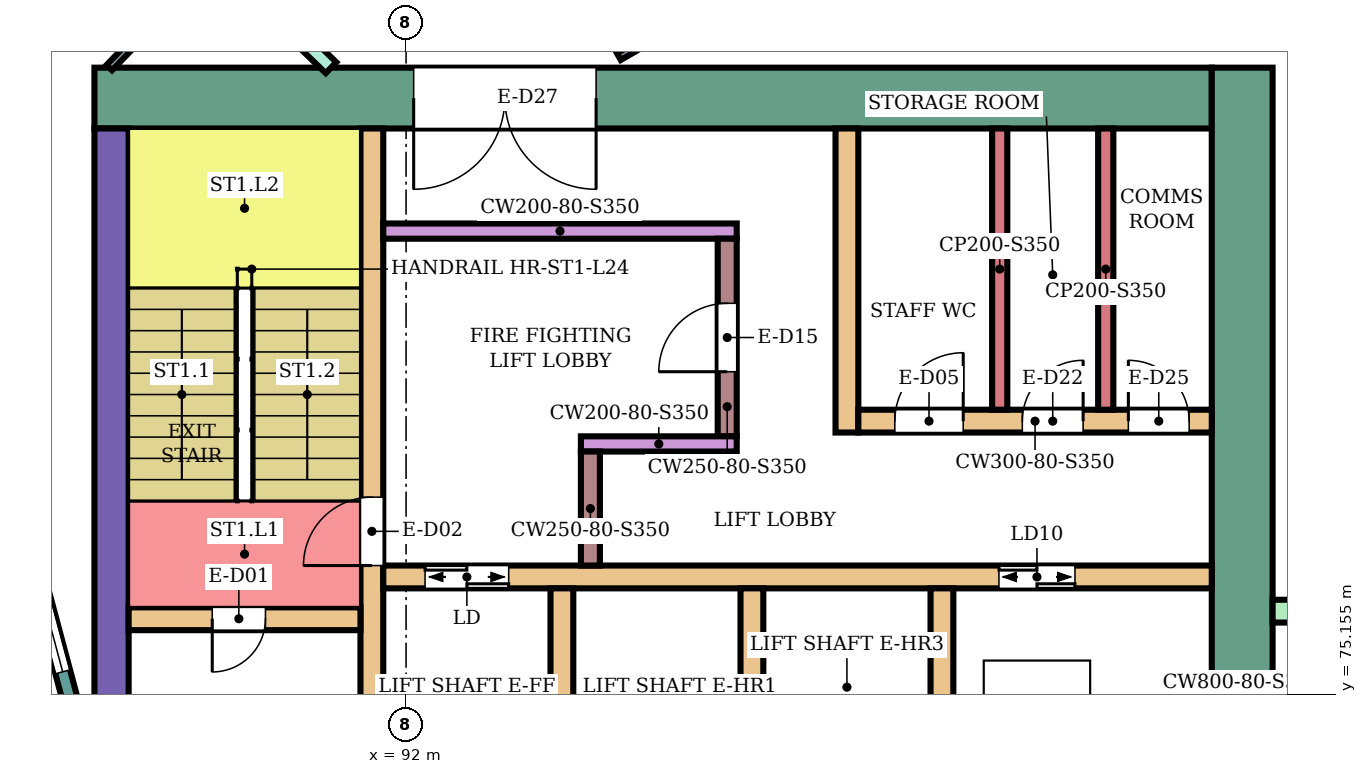
"""IFC4 building model, lengths in metres.
Left out: names, types, materials, properties, quantities, classifications, styles, units other than length and angle.
Written with IfcOpenShell. Run it as: python <this file> out.ifc"""

import sys

from ifc_helpers import new_model, si_unit, direction, frame, frame_2d, origin, place, context, subcontext, project, spatial, rectangle, extrude, element, fill, save


model = new_model("IFC4")
c1 = context("Model", 3, precision=1e-05, world=origin(), true_north=direction((0.0, 1.0)))
c2 = subcontext(c1, "Body", "Model", "MODEL_VIEW")
j1 = project(units=[si_unit("LENGTHUNIT", "METRE"), si_unit("PLANEANGLEUNIT", "RADIAN")], contexts=[c1])
p1 = place(None, origin())
s1 = spatial("IfcSite", under=j1, at=p1, CompositionType="ELEMENT")
p2 = place(p1, origin())
s2 = spatial("IfcBuilding", under=s1, at=p2, CompositionType="ELEMENT")
p3 = place(p2, frame((0.0, 0.0, 105.2)))
s3 = spatial("IfcBuildingStorey", under=s2, at=p3, CompositionType="ELEMENT", Elevation=105.2)
p4 = place(p3, frame((87.9, 83.0, 0.0), z_axis=(0.0, 0.0, 1.0), x_axis=(1.0, 0.0, 0.0)))
e1 = element("IfcWall", 1, at=p4, inside=s3, PredefinedType="SHEAR", context=c2, shape_type="SweptSolid", body=[
    extrude(rectangle(XDim=14.7, YDim=0.8, at=frame_2d((7.35, 0.0))), origin(), (0.0, 0.0, 1.0), 3.45),
])
p5 = place(p4, frame((4.2, 0.0, 0.0)))
e2 = element("IfcOpeningElement", 2, at=p5, cuts=e1, PredefinedType="OPENING", context=c2, shape_type="SweptSolid", body=[
    extrude(rectangle(XDim=2.4, YDim=2.4, at=frame_2d((1.2, 1.2))), frame((0.0, 0.41, 0.0), z_axis=(0.0, -1.0, 0.0), x_axis=(1.0, 0.0, 0.0)), (0.0, 0.0, 1.0), 0.82),
])
p6 = place(p3, frame((88.125, 75.0, 0.0), z_axis=(0.0, 0.0, 1.0), x_axis=(0.0, 1.0, 0.0)))
e3 = element("IfcWall", 3, at=p6, inside=s3, PredefinedType="SHEAR", context=c2, shape_type="SweptSolid", body=[
    extrude(rectangle(XDim=7.6, YDim=0.45, at=frame_2d((3.8, 0.0))), origin(), (0.0, 0.0, 1.0), 3.45),
])
p7 = place(p3, frame((103.0, 66.6, 0.0), z_axis=(0.0, 0.0, 1.0), x_axis=(0.0, 1.0, 0.0)))
e4 = element("IfcWall", 4, at=p7, inside=s3, PredefinedType="SHEAR", context=c2, shape_type="SweptSolid", body=[
    extrude(rectangle(XDim=16.8, YDim=0.8, at=frame_2d((8.4, 0.0))), origin(), (0.0, 0.0, 1.0), 3.45),
])
p8 = place(p3, frame((91.55, 75.0, 0.0), z_axis=(0.0, 0.0, 1.0), x_axis=(0.0, 1.0, 0.0)))
e5 = element("IfcWall", 5, at=p8, inside=s3, PredefinedType="SHEAR", context=c2, shape_type="SweptSolid", body=[
    extrude(rectangle(XDim=7.6, YDim=0.3, at=frame_2d((3.8, 0.0))), origin(), (0.0, 0.0, 1.0), 3.45),
])
p9 = place(p8, frame((1.85, 0.0, 0.0)))
e6 = element("IfcOpeningElement", 6, at=p9, cuts=e5, PredefinedType="OPENING", context=c2, shape_type="SweptSolid", body=[
    extrude(rectangle(XDim=0.9, YDim=2.1, at=frame_2d((0.45, 1.05))), frame((0.0, 0.16, 0.0), z_axis=(0.0, -1.0, 0.0), x_axis=(1.0, 0.0, 0.0)), (0.0, 0.0, 1.0), 0.32),
])
p10 = place(p3, frame((88.35, 76.15, 0.0), z_axis=(0.0, 0.0, 1.0), x_axis=(1.0, 0.0, 0.0)))
e7 = element("IfcWall", 7, at=p10, inside=s3, PredefinedType="SHEAR", context=c2, shape_type="SweptSolid", body=[
    extrude(rectangle(XDim=3.05, YDim=0.3, at=frame_2d((1.525, 0.0))), origin(), (0.0, 0.0, 1.0), 3.45),
])
p11 = place(p10, frame((1.1, 0.0, 0.0)))
e8 = element("IfcOpeningElement", 8, at=p11, cuts=e7, PredefinedType="OPENING", context=c2, shape_type="SweptSolid", body=[
    extrude(rectangle(XDim=0.7, YDim=2.0, at=frame_2d((0.35, 1.0))), frame((0.0, 0.16, 0.0), z_axis=(0.0, -1.0, 0.0), x_axis=(1.0, 0.0, 0.0)), (0.0, 0.0, 1.0), 0.32),
])
p12 = place(p3, frame((91.7, 76.7, 0.0), z_axis=(0.0, 0.0, 1.0), x_axis=(1.0, 0.0, 0.0)))
e9 = element("IfcWall", 9, at=p12, inside=s3, PredefinedType="SHEAR", context=c2, shape_type="SweptSolid", body=[
    extrude(rectangle(XDim=10.9, YDim=0.3, at=frame_2d((5.45, 0.0))), origin(), (0.0, 0.0, 1.0), 3.45),
])
p13 = place(p12, frame((0.55, 0.0, 0.0)))
e10 = element("IfcOpeningElement", 10, at=p13, cuts=e9, PredefinedType="OPENING", context=c2, shape_type="SweptSolid", body=[
    extrude(rectangle(XDim=1.1, YDim=2.1, at=frame_2d((0.55, 1.05))), frame((0.0, 0.16, 0.0), z_axis=(0.0, -1.0, 0.0), x_axis=(1.0, 0.0, 0.0)), (0.0, 0.0, 1.0), 0.32),
])
p14 = place(p12, frame((8.1, 0.0, 0.0)))
e11 = element("IfcOpeningElement", 11, at=p14, cuts=e9, PredefinedType="OPENING", context=c2, shape_type="SweptSolid", body=[
    extrude(rectangle(XDim=1.0, YDim=2.1, at=frame_2d((0.5, 1.05))), frame((0.0, 0.16, 0.0), z_axis=(0.0, -1.0, 0.0), x_axis=(1.0, 0.0, 0.0)), (0.0, 0.0, 1.0), 0.32),
])
for number, where, z_axis, x_axis in (
    (12, (94.05, 74.0, 0.0), (0.0, 0.0, 1.0), (0.0, 1.0, 0.0)),
    (13, (96.55, 74.0, 0.0), (0.0, 0.0, 1.0), (0.0, 1.0, 0.0)),
    (14, (99.05, 74.0, 0.0), (0.0, 0.0, 1.0), (0.0, 1.0, 0.0)),
):
    element("IfcWall", number, at=place(p3, frame(where, z_axis=z_axis, x_axis=x_axis)), inside=s3, PredefinedType="SHEAR", context=c2, shape_type="SweptSolid", body=[
        extrude(rectangle(XDim=2.55, YDim=0.3, at=frame_2d((1.275, 0.0))), origin(), (0.0, 0.0, 1.0), 3.45),
    ])
p15 = place(p3, frame((91.7, 81.25, 0.0), z_axis=(0.0, 0.0, 1.0), x_axis=(1.0, 0.0, 0.0)))
e15 = element("IfcWall", 15, at=p15, inside=s3, PredefinedType="SHEAR", context=c2, shape_type="SweptSolid", body=[
    extrude(rectangle(XDim=4.65, YDim=0.2, at=frame_2d((2.325, 0.0))), origin(), (0.0, 0.0, 1.0), 3.45),
])
p16 = place(p3, frame((96.225, 78.55, 0.0), z_axis=(0.0, 0.0, 1.0), x_axis=(0.0, 1.0, 0.0)))
e16 = element("IfcWall", 16, at=p16, inside=s3, PredefinedType="SHEAR", context=c2, shape_type="SweptSolid", body=[
    extrude(rectangle(XDim=2.6, YDim=0.25, at=frame_2d((1.3, 0.0))), origin(), (0.0, 0.0, 1.0), 3.45),
])
p17 = place(p16, frame((0.85, 0.0, 0.0)))
e17 = element("IfcOpeningElement", 17, at=p17, cuts=e16, PredefinedType="OPENING", context=c2, shape_type="SweptSolid", body=[
    extrude(rectangle(XDim=0.9, YDim=2.1, at=frame_2d((0.45, 1.05))), frame((0.0, 0.135, 0.0), z_axis=(0.0, -1.0, 0.0), x_axis=(1.0, 0.0, 0.0)), (0.0, 0.0, 1.0), 0.27),
])
p18 = place(p3, frame((94.3, 78.45, 0.0), z_axis=(0.0, 0.0, 1.0), x_axis=(1.0, 0.0, 0.0)))
e18 = element("IfcWall", 18, at=p18, inside=s3, PredefinedType="SHEAR", context=c2, shape_type="SweptSolid", body=[
    extrude(rectangle(XDim=2.05, YDim=0.2, at=frame_2d((1.025, 0.0))), origin(), (0.0, 0.0, 1.0), 3.45),
])
p19 = place(p3, frame((94.425, 76.85, 0.0), z_axis=(0.0, 0.0, 1.0), x_axis=(0.0, 1.0, 0.0)))
e19 = element("IfcWall", 19, at=p19, inside=s3, PredefinedType="SHEAR", context=c2, shape_type="SweptSolid", body=[
    extrude(rectangle(XDim=1.5, YDim=0.25, at=frame_2d((0.75, 0.0))), origin(), (0.0, 0.0, 1.0), 3.45),
])
p20 = place(p3, frame((97.8, 78.6, 0.0), z_axis=(0.0, 0.0, 1.0), x_axis=(0.0, 1.0, 0.0)))
e20 = element("IfcWall", 20, at=p20, inside=s3, PredefinedType="SHEAR", context=c2, shape_type="SweptSolid", body=[
    extrude(rectangle(XDim=4.0, YDim=0.3, at=frame_2d((2.0, 0.0))), origin(), (0.0, 0.0, 1.0), 3.45),
])
p21 = place(p3, frame((97.95, 78.75, 0.0), z_axis=(0.0, 0.0, 1.0), x_axis=(1.0, 0.0, 0.0)))
e21 = element("IfcWall", 21, at=p21, inside=s3, PredefinedType="SHEAR", context=c2, shape_type="SweptSolid", body=[
    extrude(rectangle(XDim=4.65, YDim=0.3, at=frame_2d((2.325, 0.0))), origin(), (0.0, 0.0, 1.0), 3.45),
])
p22 = place(p21, frame((0.48, 0.0, 0.0)))
e22 = element("IfcOpeningElement", 22, at=p22, cuts=e21, PredefinedType="OPENING", context=c2, shape_type="SweptSolid", body=[
    extrude(rectangle(XDim=0.9, YDim=2.1, at=frame_2d((0.45, 1.05))), frame((0.0, 0.16, 0.0), z_axis=(0.0, -1.0, 0.0), x_axis=(1.0, 0.0, 0.0)), (0.0, 0.0, 1.0), 0.32),
])
p23 = place(p21, frame((2.157, 0.0, 0.0)))
e23 = element("IfcOpeningElement", 23, at=p23, cuts=e21, PredefinedType="OPENING", context=c2, shape_type="SweptSolid", body=[
    extrude(rectangle(XDim=0.8, YDim=2.1, at=frame_2d((0.4, 1.05))), frame((0.0, 0.16, 0.0), z_axis=(0.0, -1.0, 0.0), x_axis=(1.0, 0.0, 0.0)), (0.0, 0.0, 1.0), 0.32),
])
p24 = place(p21, frame((3.552, 0.0, 0.0)))
e24 = element("IfcOpeningElement", 24, at=p24, cuts=e21, PredefinedType="OPENING", context=c2, shape_type="SweptSolid", body=[
    extrude(rectangle(XDim=0.8, YDim=2.1, at=frame_2d((0.4, 1.05))), frame((0.0, 0.16, 0.0), z_axis=(0.0, -1.0, 0.0), x_axis=(1.0, 0.0, 0.0)), (0.0, 0.0, 1.0), 0.32),
])
p25 = place(p3, frame((103.4, 76.25, 0.0), z_axis=(0.0, 0.0, 1.0), x_axis=(1.0, 0.0, 0.0)))
e25 = element("IfcWall", 25, at=p25, inside=s3, PredefinedType="NOTDEFINED", context=c2, shape_type="SweptSolid", body=[
    extrude(rectangle(XDim=2.416, YDim=0.3, at=frame_2d((1.208, 0.0))), origin(), (0.0, 0.0, 1.0), 3.8),
])
p26 = place(p3, frame((87.604, 75.0, 0.0), z_axis=(0.0, 0.0, 1.0), x_axis=(-0.258789828301, 0.965933654434, 0.0)))
e26 = element("IfcWall", 26, at=p26, inside=s3, PredefinedType="NOTDEFINED", context=c2, shape_type="SweptSolid", body=[
    extrude(rectangle(XDim=3.936, YDim=0.2, at=frame_2d((1.968, 0.0))), origin(), (0.0, 0.0, 1.0), 3.8),
])
p27 = place(p26, frame((0.468, 0.0, 0.9)))
e27 = element("IfcOpeningElement", 27, at=p27, cuts=e26, PredefinedType="OPENING", context=c2, shape_type="SweptSolid", body=[
    extrude(rectangle(XDim=3.0, YDim=2.3, at=frame_2d((1.5, 1.15))), frame((0.0, 0.11, 0.0), z_axis=(0.0, -1.0, 0.0), x_axis=(1.0, 0.0, 0.0)), (0.0, 0.0, 1.0), 0.22),
])
p28 = place(p3, frame((87.064, 87.211, 0.0), z_axis=(0.0, 0.0, 1.0), x_axis=(0.719540958932, -0.694450004262, 0.0)))
e28 = element("IfcWall", 28, at=p28, inside=s3, PredefinedType="PARTITIONING", context=c2, shape_type="SweptSolid", body=[
    extrude(rectangle(XDim=5.488, YDim=0.2, at=frame_2d((2.744, 0.0))), origin(), (0.0, 0.0, 1.0), 3.35),
])
p29 = place(p28, frame((0.55, 0.0, 0.0)))
e29 = element("IfcOpeningElement", 29, at=p29, cuts=e28, PredefinedType="OPENING", context=c2, shape_type="SweptSolid", body=[
    extrude(rectangle(XDim=1.0, YDim=2.1, at=frame_2d((0.5, 1.05))), frame((0.0, 0.11, 0.0), z_axis=(0.0, -1.0, 0.0), x_axis=(1.0, 0.0, 0.0)), (0.0, 0.0, 1.0), 0.22),
])
p30 = place(p3, frame((88.095, 83.4, 0.0), z_axis=(0.0, 0.0, 1.0), x_axis=(0.694447472534, 0.719543402368, 0.0)))
e30 = element("IfcWall", 30, at=p30, inside=s3, PredefinedType="PARTITIONING", context=c2, shape_type="SweptSolid", body=[
    extrude(rectangle(XDim=1.926, YDim=0.1, at=frame_2d((0.963, 0.0))), origin(), (0.0, 0.0, 1.0), 3.35),
])
p31 = place(p30, frame((0.613, 0.0, 0.0)))
e31 = element("IfcOpeningElement", 31, at=p31, cuts=e30, PredefinedType="OPENING", context=c2, shape_type="SweptSolid", body=[
    extrude(rectangle(XDim=0.8, YDim=2.1, at=frame_2d((0.4, 1.05))), frame((0.0, 0.06, 0.0), z_axis=(0.0, -1.0, 0.0), x_axis=(1.0, 0.0, 0.0)), (0.0, 0.0, 1.0), 0.12),
])
p32 = place(p3, frame((94.8, 83.545, 0.0), z_axis=(0.0, 0.0, 1.0), x_axis=(0.86602264145, 0.500004784474, 0.0)))
e32 = element("IfcWall", 32, at=p32, inside=s3, PredefinedType="PARTITIONING", context=c2, shape_type="SweptSolid", body=[
    extrude(rectangle(XDim=8.708, YDim=0.1, at=frame_2d((4.354, 0.0))), origin(), (0.0, 0.0, 1.0), 3.35),
])
p33 = place(p32, frame((3.879, 0.0, 0.0)))
e33 = element("IfcOpeningElement", 33, at=p33, cuts=e32, PredefinedType="OPENING", context=c2, shape_type="SweptSolid", body=[
    extrude(rectangle(XDim=0.9, YDim=2.1, at=frame_2d((0.45, 1.05))), frame((0.0, 0.06, 0.0), z_axis=(0.0, -1.0, 0.0), x_axis=(1.0, 0.0, 0.0)), (0.0, 0.0, 1.0), 0.12),
])
for number, where, z_axis, x_axis in (
    (34, (99.81, 78.9, 0.0), (0.0, 0.0, 1.0), (0.0, 1.0, 0.0)),
    (35, (101.205, 78.9, 0.0), (0.0, 0.0, 1.0), (0.0, 1.0, 0.0)),
):
    element("IfcWall", number, at=place(p3, frame(where, z_axis=z_axis, x_axis=x_axis)), inside=s3, PredefinedType="PARTITIONING", context=c2, shape_type="SweptSolid", body=[
        extrude(rectangle(XDim=3.7, YDim=0.2, at=frame_2d((1.85, 0.0))), origin(), (0.0, 0.0, 1.0), 3.45),
    ])
p34 = place(p27, origin())
e36 = element("IfcWindow", 36, at=p34, inside=s3, PartitioningType="SINGLE_PANEL", PredefinedType="WINDOW", context=c2, shape_type="SweptSolid", body=[
    extrude(rectangle(XDim=3.0, YDim=2.3, at=frame_2d((1.5, 1.15))), frame((0.0, 0.03, 0.0), z_axis=(0.0, -1.0, 0.0), x_axis=(1.0, 0.0, 0.0)), (0.0, 0.0, 1.0), 0.06),
])
fill(e27, e36)
p35 = place(p11, frame((0.7, 0.0, 0.0), z_axis=(0.0, 0.0, 1.0), x_axis=(-1.0, 0.0, 0.0)))
e37 = element("IfcDoor", 37, at=p35, inside=s3, OperationType="SINGLE_SWING_RIGHT", PredefinedType="DOOR", context=c2, shape_type="SweptSolid", body=[
    extrude(rectangle(XDim=0.7, YDim=2.0, at=frame_2d((0.35, 1.0))), frame((0.0, 0.025, 0.0), z_axis=(0.0, -1.0, 0.0), x_axis=(1.0, 0.0, 0.0)), (0.0, 0.0, 1.0), 0.05),
])
fill(e8, e37)
p36 = place(p9, origin())
e38 = element("IfcDoor", 38, at=p36, inside=s3, OperationType="SINGLE_SWING_LEFT", PredefinedType="DOOR", context=c2, shape_type="SweptSolid", body=[
    extrude(rectangle(XDim=0.9, YDim=2.1, at=frame_2d((0.45, 1.05))), frame((0.0, 0.025, 0.0), z_axis=(0.0, -1.0, 0.0), x_axis=(1.0, 0.0, 0.0)), (0.0, 0.0, 1.0), 0.05),
])
fill(e6, e38)
p37 = place(p13, origin())
e39 = element("IfcDoor", 39, at=p37, inside=s3, OperationType="DOUBLE_DOOR_SLIDING", PredefinedType="DOOR", context=c2, shape_type="SweptSolid", body=[
    extrude(rectangle(XDim=1.1, YDim=2.1, at=frame_2d((0.55, 1.05))), frame((0.0, 0.025, 0.0), z_axis=(0.0, -1.0, 0.0), x_axis=(1.0, 0.0, 0.0)), (0.0, 0.0, 1.0), 0.05),
])
fill(e10, e39)
p38 = place(p14, origin())
e40 = element("IfcDoor", 40, at=p38, inside=s3, OperationType="DOUBLE_DOOR_SLIDING", PredefinedType="DOOR", context=c2, shape_type="SweptSolid", body=[
    extrude(rectangle(XDim=1.0, YDim=2.1, at=frame_2d((0.5, 1.05))), frame((0.0, 0.025, 0.0), z_axis=(0.0, -1.0, 0.0), x_axis=(1.0, 0.0, 0.0)), (0.0, 0.0, 1.0), 0.05),
])
fill(e11, e40)
p39 = place(p17, origin())
e41 = element("IfcDoor", 41, at=p39, inside=s3, OperationType="SINGLE_SWING_LEFT", PredefinedType="DOOR", context=c2, shape_type="SweptSolid", body=[
    extrude(rectangle(XDim=0.9, YDim=2.1, at=frame_2d((0.45, 1.05))), frame((0.0, 0.025, 0.0), z_axis=(0.0, -1.0, 0.0), x_axis=(1.0, 0.0, 0.0)), (0.0, 0.0, 1.0), 0.05),
])
fill(e17, e41)
p40 = place(p22, origin())
e42 = element("IfcDoor", 42, at=p40, inside=s3, OperationType="SINGLE_SWING_RIGHT", PredefinedType="DOOR", context=c2, shape_type="SweptSolid", body=[
    extrude(rectangle(XDim=0.9, YDim=2.1, at=frame_2d((0.45, 1.05))), frame((0.0, 0.025, 0.0), z_axis=(0.0, -1.0, 0.0), x_axis=(1.0, 0.0, 0.0)), (0.0, 0.0, 1.0), 0.05),
])
fill(e22, e42)
p41 = place(p23, origin())
e43 = element("IfcDoor", 43, at=p41, inside=s3, OperationType="SINGLE_SWING_RIGHT", PredefinedType="DOOR", context=c2, shape_type="SweptSolid", body=[
    extrude(rectangle(XDim=0.8, YDim=2.1, at=frame_2d((0.4, 1.05))), frame((0.0, 0.025, 0.0), z_axis=(0.0, -1.0, 0.0), x_axis=(1.0, 0.0, 0.0)), (0.0, 0.0, 1.0), 0.05),
])
fill(e23, e43)
p42 = place(p24, origin())
e44 = element("IfcDoor", 44, at=p42, inside=s3, OperationType="SINGLE_SWING_LEFT", PredefinedType="DOOR", context=c2, shape_type="SweptSolid", body=[
    extrude(rectangle(XDim=0.8, YDim=2.1, at=frame_2d((0.4, 1.05))), frame((0.0, 0.025, 0.0), z_axis=(0.0, -1.0, 0.0), x_axis=(1.0, 0.0, 0.0)), (0.0, 0.0, 1.0), 0.05),
])
fill(e24, e44)
p43 = place(p5, frame((2.4, 0.0, 0.0), z_axis=(0.0, 0.0, 1.0), x_axis=(-1.0, 0.0, 0.0)))
e45 = element("IfcDoor", 45, at=p43, inside=s3, OperationType="DOUBLE_DOOR_SINGLE_SWING", PredefinedType="DOOR", context=c2, shape_type="SweptSolid", body=[
    extrude(rectangle(XDim=2.4, YDim=2.4, at=frame_2d((1.2, 1.2))), frame((0.0, 0.025, 0.0), z_axis=(0.0, -1.0, 0.0), x_axis=(1.0, 0.0, 0.0)), (0.0, 0.0, 1.0), 0.05),
])
fill(e2, e45)
save(model, sys.argv[1])
